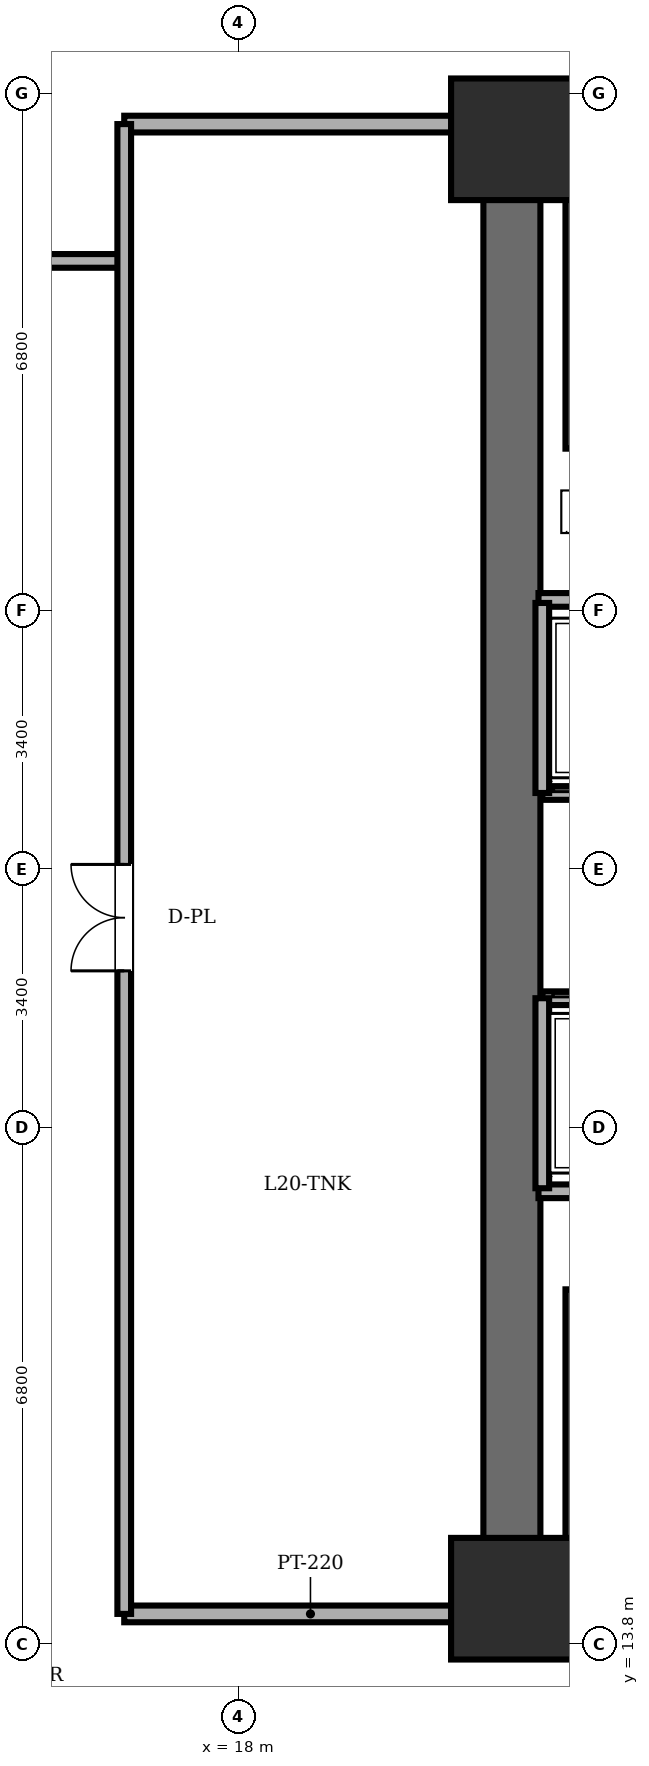
"""IFC4 building model, lengths in metres.
Left out: names, types, materials, properties, quantities, classifications, styles, units other than length and angle.
Written with IfcOpenShell. Run it as: python <this file> out.ifc"""

import sys

from ifc_helpers import new_model, si_unit, direction, frame, frame_2d, origin, origin_2d, place, context, subcontext, project, spatial, rectangle, extrude, element, fill, save


model = new_model("IFC4")
c1 = context("Model", 3, precision=1e-05, world=origin(), true_north=direction((0.0, 1.0)))
c2 = subcontext(c1, "Body", "Model", "MODEL_VIEW")
j1 = project(units=[si_unit("LENGTHUNIT", "METRE"), si_unit("PLANEANGLEUNIT", "RADIAN")], contexts=[c1])
p1 = place(None, origin())
s1 = spatial("IfcSite", under=j1, at=p1, CompositionType="ELEMENT")
p2 = place(p1, origin())
s2 = spatial("IfcBuilding", under=s1, at=p2, CompositionType="ELEMENT")
p3 = place(p2, frame((0.0, 0.0, 75.6)))
s3 = spatial("IfcBuildingStorey", under=s2, at=p3, CompositionType="ELEMENT", Elevation=75.6)
for number, where, z_axis, x_axis in (
    (1, (21.6, 14.4, 0.0), (0.0, 0.0, 1.0), (1.0, 0.0, 0.0)),
    (2, (21.6, 33.6, 0.0), (0.0, 0.0, 1.0), (1.0, 0.0, 0.0)),
):
    element("IfcColumn", number, at=place(p3, frame(where, z_axis=z_axis, x_axis=x_axis)), inside=s3, PredefinedType="COLUMN", context=c2, shape_type="SweptSolid", body=[
        extrude(rectangle(XDim=1.6, YDim=1.6, at=origin_2d()), origin(), (0.0, 0.0, 1.0), 5.6),
    ])
p4 = place(p3, frame((21.6, 14.4, 0.0), z_axis=(0.0, 0.0, 1.0), x_axis=(0.0, 1.0, 0.0)))
e3 = element("IfcWall", 3, at=p4, inside=s3, PredefinedType="SHEAR", context=c2, shape_type="SweptSolid", body=[
    extrude(rectangle(XDim=19.2, YDim=0.75, at=frame_2d((9.6, 0.0))), origin(), (0.0, 0.0, 1.0), 5.36),
])
for number, where, z_axis, x_axis in (
    (4, (21.6, 33.6, 0.0), (0.0, 0.0, 1.0), (1.0, 0.0, 0.0)),
    (5, (37.2, 14.4, 0.0), (0.0, 0.0, 1.0), (-1.0, 0.0, 0.0)),
):
    element("IfcWall", number, at=place(p3, frame(where, z_axis=z_axis, x_axis=x_axis)), inside=s3, PredefinedType="SHEAR", context=c2, shape_type="SweptSolid", body=[
        extrude(rectangle(XDim=15.6, YDim=0.75, at=frame_2d((7.8, 0.0))), origin(), (0.0, 0.0, 1.0), 5.36),
    ])
for number, where, z_axis, x_axis in (
    (6, (22.48, 29.53, 0.0), (0.0, 0.0, 1.0), (0.0, 1.0, 0.0)),
    (7, (22.48, 14.89, 0.0), (0.0, 0.0, 1.0), (0.0, 1.0, 0.0)),
):
    element("IfcWall", number, at=place(p3, frame(where, z_axis=z_axis, x_axis=x_axis)), inside=s3, PredefinedType="SOLIDWALL", context=c2, shape_type="SweptSolid", body=[
        extrude(rectangle(XDim=3.58, YDim=0.35, at=frame_2d((1.79, 0.0))), origin(), (0.0, 0.0, 1.0), 5.36),
    ])
p5 = place(p3, frame((21.95, 27.54, 0.0), z_axis=(0.0, 0.0, 1.0), x_axis=(1.0, 0.0, 0.0)))
e8 = element("IfcWall", 8, at=p5, inside=s3, PredefinedType="PARTITIONING", context=c2, shape_type="SweptSolid", body=[
    extrude(rectangle(XDim=10.56, YDim=0.18, at=frame_2d((5.28, 0.0))), origin(), (0.0, 0.0, 1.0), 5.36),
])
p6 = place(p3, frame((21.95, 19.76, 0.0), z_axis=(0.0, 0.0, 1.0), x_axis=(1.0, 0.0, 0.0)))
e9 = element("IfcWall", 9, at=p6, inside=s3, PredefinedType="PARTITIONING", context=c2, shape_type="SweptSolid", body=[
    extrude(rectangle(XDim=14.87, YDim=0.18, at=frame_2d((7.435, 0.0))), origin(), (0.0, 0.0, 1.0), 5.36),
])
p7 = place(p3, frame((24.02, 25.0, 0.0), z_axis=(0.0, 0.0, 1.0), x_axis=(-1.0, 0.0, 0.0)))
e10 = element("IfcWall", 10, at=p7, inside=s3, PredefinedType="PARTITIONING", context=c2, shape_type="SweptSolid", body=[
    extrude(rectangle(XDim=2.02, YDim=0.18, at=frame_2d((1.01, 0.0))), origin(), (0.0, 0.0, 1.0), 5.36),
])
p8 = place(p7, frame((0.435, 0.0, 0.0)))
e11 = element("IfcOpeningElement", 11, at=p8, cuts=e10, PredefinedType="OPENING", context=c2, shape_type="SweptSolid", body=[
    extrude(rectangle(XDim=1.15, YDim=2.2, at=frame_2d((0.575, 1.1))), frame((0.0, 0.1, 0.0), z_axis=(0.0, -1.0, 0.0), x_axis=(1.0, 0.0, 0.0)), (0.0, 0.0, 1.0), 0.2),
])
p9 = place(p3, frame((22.0, 27.5, 0.0), z_axis=(0.0, 0.0, 1.0), x_axis=(0.0, -1.0, 0.0)))
e12 = element("IfcWall", 12, at=p9, inside=s3, PredefinedType="PARTITIONING", context=c2, shape_type="SweptSolid", body=[
    extrude(rectangle(XDim=2.5, YDim=0.18, at=frame_2d((1.25, 0.0))), origin(), (0.0, 0.0, 1.0), 5.36),
])
p10 = place(p3, frame((22.0, 22.3, 0.0), z_axis=(0.0, 0.0, 1.0), x_axis=(1.0, 0.0, 0.0)))
e13 = element("IfcWall", 13, at=p10, inside=s3, PredefinedType="PARTITIONING", context=c2, shape_type="SweptSolid", body=[
    extrude(rectangle(XDim=2.0, YDim=0.18, at=frame_2d((1.0, 0.0))), origin(), (0.0, 0.0, 1.0), 5.36),
])
p11 = place(p10, frame((0.425, 0.0, 0.0)))
e14 = element("IfcOpeningElement", 14, at=p11, cuts=e13, PredefinedType="OPENING", context=c2, shape_type="SweptSolid", body=[
    extrude(rectangle(XDim=1.15, YDim=2.2, at=frame_2d((0.575, 1.1))), frame((0.0, 0.1, 0.0), z_axis=(0.0, -1.0, 0.0), x_axis=(1.0, 0.0, 0.0)), (0.0, 0.0, 1.0), 0.2),
])
p12 = place(p3, frame((22.0, 22.3, 0.0), z_axis=(0.0, 0.0, 1.0), x_axis=(0.0, -1.0, 0.0)))
e15 = element("IfcWall", 15, at=p12, inside=s3, PredefinedType="PARTITIONING", context=c2, shape_type="SweptSolid", body=[
    extrude(rectangle(XDim=2.5, YDim=0.18, at=frame_2d((1.25, 0.0))), origin(), (0.0, 0.0, 1.0), 5.36),
])
p13 = place(p3, frame((16.5, 14.2, 0.0), z_axis=(0.0, 0.0, 1.0), x_axis=(1.0, 0.0, 0.0)))
e16 = element("IfcWall", 16, at=p13, inside=s3, PredefinedType="PARTITIONING", context=c2, shape_type="SweptSolid", body=[
    extrude(rectangle(XDim=4.9, YDim=0.22, at=frame_2d((2.45, 0.0))), origin(), (0.0, 0.0, 1.0), 5.36),
])
p14 = place(p3, frame((13.5, 32.0, 0.0), z_axis=(0.0, 0.0, 1.0), x_axis=(1.0, 0.0, 0.0)))
e17 = element("IfcWall", 17, at=p14, inside=s3, PredefinedType="PARTITIONING", context=c2, shape_type="SweptSolid", body=[
    extrude(rectangle(XDim=3.0, YDim=0.18, at=frame_2d((1.5, 0.0))), origin(), (0.0, 0.0, 1.0), 5.36),
])
p15 = place(p3, frame((16.5, 33.8, 0.0), z_axis=(0.0, 0.0, 1.0), x_axis=(1.0, 0.0, 0.0)))
e18 = element("IfcWall", 18, at=p15, inside=s3, PredefinedType="PARTITIONING", context=c2, shape_type="SweptSolid", body=[
    extrude(rectangle(XDim=4.9, YDim=0.22, at=frame_2d((2.45, 0.0))), origin(), (0.0, 0.0, 1.0), 5.36),
])
p16 = place(p3, frame((16.5, 14.2, 0.0), z_axis=(0.0, 0.0, 1.0), x_axis=(0.0, 1.0, 0.0)))
e19 = element("IfcWall", 19, at=p16, inside=s3, PredefinedType="PARTITIONING", context=c2, shape_type="SweptSolid", body=[
    extrude(rectangle(XDim=19.6, YDim=0.18, at=frame_2d((9.8, 0.0))), origin(), (0.0, 0.0, 1.0), 5.36),
])
p17 = place(p16, frame((8.46, 0.0, 0.0)))
e20 = element("IfcOpeningElement", 20, at=p17, cuts=e19, PredefinedType="OPENING", context=c2, shape_type="SweptSolid", body=[
    extrude(rectangle(XDim=1.4, YDim=2.25, at=frame_2d((0.7, 1.125))), frame((0.0, 0.1, 0.0), z_axis=(0.0, -1.0, 0.0), x_axis=(1.0, 0.0, 0.0)), (0.0, 0.0, 1.0), 0.2),
])
p18 = place(p17, origin())
e21 = element("IfcDoor", 21, at=p18, inside=s3, OperationType="DOUBLE_DOOR_SINGLE_SWING", PredefinedType="DOOR", context=c2, shape_type="SweptSolid", body=[
    extrude(rectangle(XDim=1.4, YDim=2.25, at=frame_2d((0.7, 1.125))), frame((0.0, 0.025, 0.0), z_axis=(0.0, -1.0, 0.0), x_axis=(1.0, 0.0, 0.0)), (0.0, 0.0, 1.0), 0.05),
])
fill(e20, e21)
save(model, sys.argv[1])
